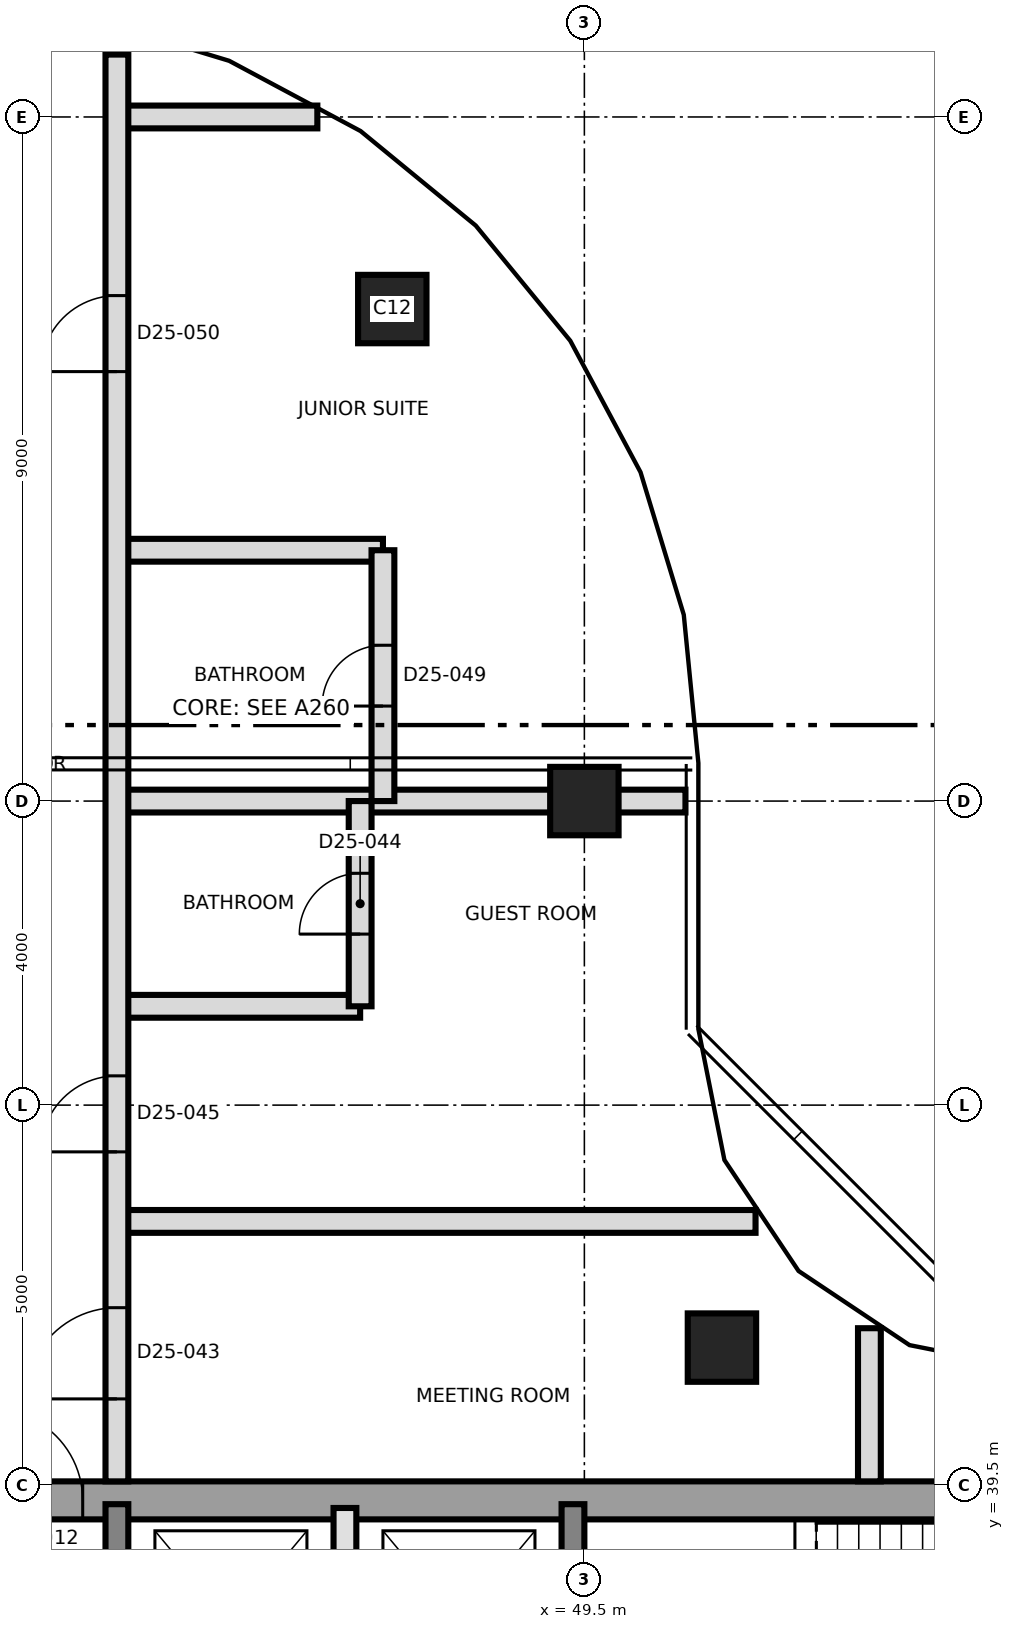
"""IFC4 building model, lengths in metres.
Left out: names, types, materials, properties, quantities, classifications, styles, units other than length and angle.
Written with IfcOpenShell. Run it as: python <this file> out.ifc"""

import sys

from ifc_helpers import new_model, si_unit, direction, frame, frame_2d, origin, origin_2d, place, context, subcontext, project, spatial, rectangle, extrude, element, fill, save


model = new_model("IFC4")
c1 = context("Model", 3, precision=1e-05, world=origin(), true_north=direction((0.0, 1.0)))
c2 = subcontext(c1, "Body", "Model", "MODEL_VIEW")
j1 = project(units=[si_unit("LENGTHUNIT", "METRE"), si_unit("PLANEANGLEUNIT", "RADIAN")], contexts=[c1])
p1 = place(None, origin())
s1 = spatial("IfcSite", under=j1, at=p1, CompositionType="ELEMENT")
p2 = place(p1, origin())
s2 = spatial("IfcBuilding", under=s1, at=p2, CompositionType="ELEMENT")
p3 = place(p2, frame((0.0, 0.0, 229.1)))
s3 = spatial("IfcBuildingStorey", under=s2, at=p3, CompositionType="ELEMENT", Elevation=229.1)
p4 = place(p3, frame((31.25, 39.3, 0.0), z_axis=(0.0, 0.0, 1.0), x_axis=(1.0, 0.0, 0.0)))
e1 = element("IfcWall", 1, at=p4, inside=s3, PredefinedType="SHEAR", context=c2, shape_type="SweptSolid", body=[
    extrude(rectangle(XDim=27.0, YDim=0.5, at=frame_2d((13.5, 0.0))), origin(), (0.0, 0.0, 1.0), 3.7),
])
p5 = place(p4, frame((10.45, 0.0, 0.0)))
e2 = element("IfcOpeningElement", 2, at=p5, cuts=e1, PredefinedType="OPENING", context=c2, shape_type="SweptSolid", body=[
    extrude(rectangle(XDim=1.2, YDim=2.1, at=frame_2d((0.6, 1.05))), frame((0.0, 0.26, 0.0), z_axis=(0.0, -1.0, 0.0), x_axis=(1.0, 0.0, 0.0)), (0.0, 0.0, 1.0), 0.52),
])
for number, where, z_axis, x_axis in (
    (3, (43.35, 33.5, 0.0), (0.0, 0.0, 1.0), (0.0, 1.0, 0.0)),
    (4, (49.35, 33.5, 0.0), (0.0, 0.0, 1.0), (0.0, 1.0, 0.0)),
):
    element("IfcWall", number, at=place(p3, frame(where, z_axis=z_axis, x_axis=x_axis)), inside=s3, PredefinedType="SHEAR", context=c2, shape_type="SweptSolid", body=[
        extrude(rectangle(XDim=5.75, YDim=0.3, at=frame_2d((2.875, 0.0))), origin(), (0.0, 0.0, 1.0), 3.7),
    ])
for number, where, z_axis, x_axis in (
    (5, (51.31, 41.31, 0.0), (0.0, 0.0, 1.0), (1.0, 0.0, 0.0)),
    (6, (49.5, 48.5, 0.0), (0.0, 0.0, 1.0), (1.0, 0.0, 0.0)),
    (7, (46.973, 54.973, 0.0), (0.0, 0.0, 1.0), (1.0, 0.0, 0.0)),
):
    element("IfcColumn", number, at=place(p3, frame(where, z_axis=z_axis, x_axis=x_axis)), inside=s3, PredefinedType="COLUMN", context=c2, shape_type="SweptSolid", body=[
        extrude(rectangle(XDim=0.9, YDim=0.9, at=origin_2d()), origin(), (0.0, 0.0, 1.0), 3.7),
    ])
p6 = place(p3, frame((46.35, 36.2, 0.0), z_axis=(0.0, 0.0, 1.0), x_axis=(0.0, 1.0, 0.0)))
e8 = element("IfcWall", 8, at=p6, inside=s3, PredefinedType="SOLIDWALL", context=c2, shape_type="SweptSolid", body=[
    extrude(rectangle(XDim=3.0, YDim=0.3, at=frame_2d((1.5, 0.0))), origin(), (0.0, 0.0, 1.0), 3.4),
])
p7 = place(p3, frame((43.35, 42.97, 0.0), z_axis=(0.0, 0.0, 1.0), x_axis=(1.0, 0.0, 0.0)))
e9 = element("IfcWall", 9, at=p7, inside=s3, PredefinedType="PARTITIONING", context=c2, shape_type="SweptSolid", body=[
    extrude(rectangle(XDim=8.402, YDim=0.3, at=frame_2d((4.201, 0.0))), origin(), (0.0, 0.0, 1.0), 3.4),
])
p8 = place(p3, frame((43.35, 45.8, 0.0), z_axis=(0.0, 0.0, 1.0), x_axis=(1.0, 0.0, 0.0)))
e10 = element("IfcWall", 10, at=p8, inside=s3, PredefinedType="PARTITIONING", context=c2, shape_type="SweptSolid", body=[
    extrude(rectangle(XDim=3.2, YDim=0.3, at=frame_2d((1.6, 0.0))), origin(), (0.0, 0.0, 1.0), 3.4),
])
p9 = place(p3, frame((43.35, 48.5, 0.0), z_axis=(0.0, 0.0, 1.0), x_axis=(1.0, 0.0, 0.0)))
e11 = element("IfcWall", 11, at=p9, inside=s3, PredefinedType="PARTITIONING", context=c2, shape_type="SweptSolid", body=[
    extrude(rectangle(XDim=7.48, YDim=0.3, at=frame_2d((3.74, 0.0))), origin(), (0.0, 0.0, 1.0), 3.4),
])
p10 = place(p3, frame((43.35, 51.8, 0.0), z_axis=(0.0, 0.0, 1.0), x_axis=(1.0, 0.0, 0.0)))
e12 = element("IfcWall", 12, at=p10, inside=s3, PredefinedType="PARTITIONING", context=c2, shape_type="SweptSolid", body=[
    extrude(rectangle(XDim=3.5, YDim=0.3, at=frame_2d((1.75, 0.0))), origin(), (0.0, 0.0, 1.0), 3.4),
])
p11 = place(p3, frame((43.35, 57.5, 0.0), z_axis=(0.0, 0.0, 1.0), x_axis=(1.0, 0.0, 0.0)))
e13 = element("IfcWall", 13, at=p11, inside=s3, PredefinedType="PARTITIONING", context=c2, shape_type="SweptSolid", body=[
    extrude(rectangle(XDim=2.637, YDim=0.3, at=frame_2d((1.318, 0.0))), origin(), (0.0, 0.0, 1.0), 3.4),
])
p12 = place(p3, frame((43.35, 39.55, 0.0), z_axis=(0.0, 0.0, 1.0), x_axis=(0.0, 1.0, 0.0)))
e14 = element("IfcWall", 14, at=p12, inside=s3, PredefinedType="PARTITIONING", context=c2, shape_type="SweptSolid", body=[
    extrude(rectangle(XDim=18.771, YDim=0.3, at=frame_2d((9.385, 0.0))), origin(), (0.0, 0.0, 1.0), 3.4),
])
p13 = place(p12, frame((1.085, 0.0, 0.0)))
e15 = element("IfcOpeningElement", 15, at=p13, cuts=e14, PredefinedType="OPENING", context=c2, shape_type="SweptSolid", body=[
    extrude(rectangle(XDim=1.2, YDim=2.1, at=frame_2d((0.6, 1.05))), frame((0.0, 0.16, 0.0), z_axis=(0.0, -1.0, 0.0), x_axis=(1.0, 0.0, 0.0)), (0.0, 0.0, 1.0), 0.32),
])
p14 = place(p12, frame((4.335, 0.0, 0.0)))
e16 = element("IfcOpeningElement", 16, at=p14, cuts=e14, PredefinedType="OPENING", context=c2, shape_type="SweptSolid", body=[
    extrude(rectangle(XDim=1.0, YDim=2.1, at=frame_2d((0.5, 1.05))), frame((0.0, 0.16, 0.0), z_axis=(0.0, -1.0, 0.0), x_axis=(1.0, 0.0, 0.0)), (0.0, 0.0, 1.0), 0.32),
])
p15 = place(p12, frame((14.6, 0.0, 0.0)))
e17 = element("IfcOpeningElement", 17, at=p15, cuts=e14, PredefinedType="OPENING", context=c2, shape_type="SweptSolid", body=[
    extrude(rectangle(XDim=1.0, YDim=2.4, at=frame_2d((0.5, 1.2))), frame((0.0, 0.16, 0.0), z_axis=(0.0, -1.0, 0.0), x_axis=(1.0, 0.0, 0.0)), (0.0, 0.0, 1.0), 0.32),
])
p16 = place(p3, frame((46.55, 45.8, 0.0), z_axis=(0.0, 0.0, 1.0), x_axis=(0.0, 1.0, 0.0)))
e18 = element("IfcWall", 18, at=p16, inside=s3, PredefinedType="PARTITIONING", context=c2, shape_type="SweptSolid", body=[
    extrude(rectangle(XDim=2.7, YDim=0.3, at=frame_2d((1.35, 0.0))), origin(), (0.0, 0.0, 1.0), 3.4),
])
p17 = place(p16, frame((0.95, 0.0, 0.0)))
e19 = element("IfcOpeningElement", 19, at=p17, cuts=e18, PredefinedType="OPENING", context=c2, shape_type="SweptSolid", body=[
    extrude(rectangle(XDim=0.8, YDim=2.1, at=frame_2d((0.4, 1.05))), frame((0.0, 0.16, 0.0), z_axis=(0.0, -1.0, 0.0), x_axis=(1.0, 0.0, 0.0)), (0.0, 0.0, 1.0), 0.32),
])
p18 = place(p3, frame((46.85, 48.5, 0.0), z_axis=(0.0, 0.0, 1.0), x_axis=(0.0, 1.0, 0.0)))
e20 = element("IfcWall", 20, at=p18, inside=s3, PredefinedType="PARTITIONING", context=c2, shape_type="SweptSolid", body=[
    extrude(rectangle(XDim=3.3, YDim=0.3, at=frame_2d((1.65, 0.0))), origin(), (0.0, 0.0, 1.0), 3.4),
])
p19 = place(p18, frame((1.25, 0.0, 0.0)))
e21 = element("IfcOpeningElement", 21, at=p19, cuts=e20, PredefinedType="OPENING", context=c2, shape_type="SweptSolid", body=[
    extrude(rectangle(XDim=0.8, YDim=2.1, at=frame_2d((0.4, 1.05))), frame((0.0, 0.16, 0.0), z_axis=(0.0, -1.0, 0.0), x_axis=(1.0, 0.0, 0.0)), (0.0, 0.0, 1.0), 0.32),
])
p20 = place(p3, frame((53.25, 39.55, 0.0), z_axis=(0.0, 0.0, 1.0), x_axis=(0.0, 1.0, 0.0)))
e22 = element("IfcWall", 22, at=p20, inside=s3, PredefinedType="PARTITIONING", context=c2, shape_type="SweptSolid", body=[
    extrude(rectangle(XDim=2.015, YDim=0.3, at=frame_2d((1.007, 0.0))), origin(), (0.0, 0.0, 1.0), 3.4),
])
p21 = place(p5, origin())
e23 = element("IfcDoor", 23, at=p21, inside=s3, OperationType="SINGLE_SWING_RIGHT", PredefinedType="DOOR", context=c2, shape_type="SweptSolid", body=[
    extrude(rectangle(XDim=1.2, YDim=2.1, at=frame_2d((0.6, 1.05))), frame((0.0, 0.025, 0.0), z_axis=(0.0, -1.0, 0.0), x_axis=(1.0, 0.0, 0.0)), (0.0, 0.0, 1.0), 0.05),
])
fill(e2, e23)
p22 = place(p13, origin())
e24 = element("IfcDoor", 24, at=p22, inside=s3, OperationType="SINGLE_SWING_RIGHT", PredefinedType="DOOR", context=c2, shape_type="SweptSolid", body=[
    extrude(rectangle(XDim=1.2, YDim=2.1, at=frame_2d((0.6, 1.05))), frame((0.0, 0.025, 0.0), z_axis=(0.0, -1.0, 0.0), x_axis=(1.0, 0.0, 0.0)), (0.0, 0.0, 1.0), 0.05),
])
fill(e15, e24)
p23 = place(p17, origin())
e25 = element("IfcDoor", 25, at=p23, inside=s3, OperationType="SINGLE_SWING_LEFT", PredefinedType="DOOR", context=c2, shape_type="SweptSolid", body=[
    extrude(rectangle(XDim=0.8, YDim=2.1, at=frame_2d((0.4, 1.05))), frame((0.0, 0.025, 0.0), z_axis=(0.0, -1.0, 0.0), x_axis=(1.0, 0.0, 0.0)), (0.0, 0.0, 1.0), 0.05),
])
fill(e19, e25)
p24 = place(p14, origin())
e26 = element("IfcDoor", 26, at=p24, inside=s3, OperationType="SINGLE_SWING_LEFT", PredefinedType="DOOR", context=c2, shape_type="SweptSolid", body=[
    extrude(rectangle(XDim=1.0, YDim=2.1, at=frame_2d((0.5, 1.05))), frame((0.0, 0.025, 0.0), z_axis=(0.0, -1.0, 0.0), x_axis=(1.0, 0.0, 0.0)), (0.0, 0.0, 1.0), 0.05),
])
fill(e16, e26)
p25 = place(p19, origin())
e27 = element("IfcDoor", 27, at=p25, inside=s3, OperationType="SINGLE_SWING_LEFT", PredefinedType="DOOR", context=c2, shape_type="SweptSolid", body=[
    extrude(rectangle(XDim=0.8, YDim=2.1, at=frame_2d((0.4, 1.05))), frame((0.0, 0.025, 0.0), z_axis=(0.0, -1.0, 0.0), x_axis=(1.0, 0.0, 0.0)), (0.0, 0.0, 1.0), 0.05),
])
fill(e21, e27)
p26 = place(p15, origin())
e28 = element("IfcDoor", 28, at=p26, inside=s3, OperationType="SINGLE_SWING_RIGHT", PredefinedType="DOOR", context=c2, shape_type="SweptSolid", body=[
    extrude(rectangle(XDim=1.0, YDim=2.4, at=frame_2d((0.5, 1.2))), frame((0.0, 0.025, 0.0), z_axis=(0.0, -1.0, 0.0), x_axis=(1.0, 0.0, 0.0)), (0.0, 0.0, 1.0), 0.05),
])
fill(e17, e28)
save(model, sys.argv[1])
